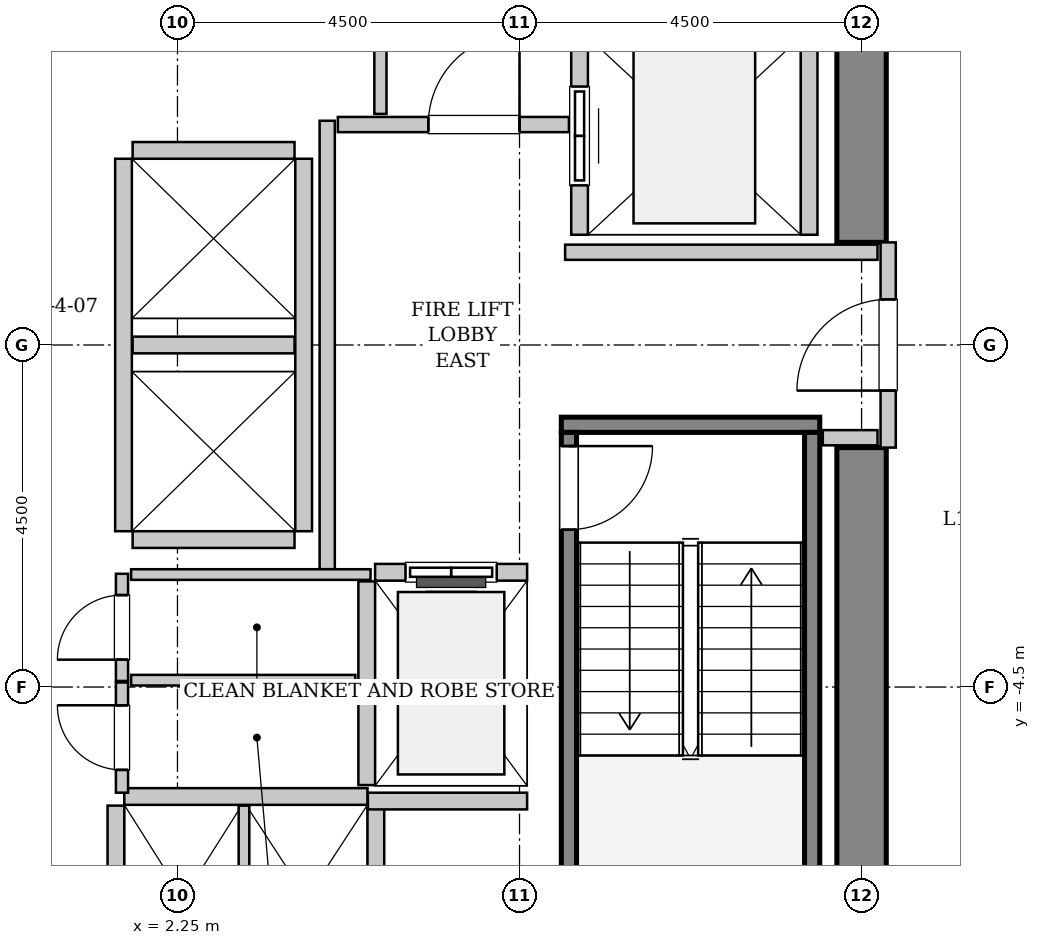
"""IFC4 building model, lengths in metres.
Left out: names, types, materials, properties, quantities, classifications, styles, units other than length and angle.
Written with IfcOpenShell. Run it as: python <this file> out.ifc"""

import sys

from ifc_helpers import new_model, si_unit, direction, frame, frame_2d, origin, place, context, subcontext, project, spatial, rectangle, extrude, source, transform, mapped, element, fill, save


model = new_model("IFC4")
c1 = context("Model", 3, precision=1e-05, world=origin(), true_north=direction((0.0, 1.0)))
c2 = subcontext(c1, "Body", "Model", "MODEL_VIEW")
j1 = project(units=[si_unit("LENGTHUNIT", "METRE"), si_unit("PLANEANGLEUNIT", "RADIAN")], contexts=[c1])
p1 = place(None, origin())
s1 = spatial("IfcSite", under=j1, at=p1, CompositionType="ELEMENT")
p2 = place(p1, origin())
s2 = spatial("IfcBuilding", under=s1, at=p2, CompositionType="ELEMENT")
p3 = place(p2, frame((0.0, 0.0, 55.8)))
s3 = spatial("IfcBuildingStorey", under=s2, at=p3, CompositionType="ELEMENT", Elevation=55.8)
m1 = source(origin(), c2, "Body", "SweptSolid", [
    extrude(rectangle(XDim=7.325, YDim=0.65, at=frame_2d((3.663, 0.0))), origin(), (0.0, 0.0, 1.0), 3.8),
])
for number, where, z_axis, x_axis in (
    (1, (11.25, -8.675, 0.0), (0.0, 0.0, 1.0), (0.0, 1.0, 0.0)),
    (2, (11.25, 1.35, 0.0), (0.0, 0.0, 1.0), (0.0, 1.0, 0.0)),
):
    element("IfcWall", number, at=place(p3, frame(where, z_axis=z_axis, x_axis=x_axis)), inside=s3, PredefinedType="SHEAR", context=c2, shape_type="MappedRepresentation", body=[
        mapped(m1, transform((0.0, 0.0, 0.0), x_axis=(1.0, 0.0, 0.0), y_axis=(0.0, 1.0, 0.0), z_axis=(0.0, 0.0, 1.0), scale=1.0)),
    ])
m2 = source(origin(), c2, "Body", "SweptSolid", [
    extrude(rectangle(XDim=3.4, YDim=0.2, at=frame_2d((1.7, 0.0))), origin(), (0.0, 0.0, 1.0), 3.8),
])
p4 = place(p3, frame((7.3, -1.05, 0.0), z_axis=(0.0, 0.0, 1.0), x_axis=(1.0, 0.0, 0.0)))
e3 = element("IfcWall", 3, at=p4, inside=s3, PredefinedType="SOLIDWALL", context=c2, shape_type="MappedRepresentation", body=[
    mapped(m2, transform((0.0, 0.0, 0.0), x_axis=(1.0, 0.0, 0.0), y_axis=(0.0, 1.0, 0.0), z_axis=(0.0, 0.0, 1.0), scale=1.0)),
])
m3 = source(origin(), c2, "Body", "SweptSolid", [
    extrude(rectangle(XDim=7.1, YDim=0.2, at=frame_2d((3.55, 0.0))), origin(), (0.0, 0.0, 1.0), 3.8),
])
p5 = place(p3, frame((7.4, -1.15, 0.0), z_axis=(0.0, 0.0, 1.0), x_axis=(0.0, -1.0, 0.0)))
e4 = element("IfcWall", 4, at=p5, inside=s3, PredefinedType="SOLIDWALL", context=c2, shape_type="MappedRepresentation", body=[
    mapped(m3, transform((0.0, 0.0, 0.0), x_axis=(1.0, 0.0, 0.0), y_axis=(0.0, 1.0, 0.0), z_axis=(0.0, 0.0, 1.0), scale=1.0)),
])
p6 = place(p5, frame((0.18, 0.0, 0.0)))
e5 = element("IfcOpeningElement", 5, at=p6, cuts=e4, PredefinedType="OPENING", context=c2, shape_type="SweptSolid", body=[
    extrude(rectangle(XDim=1.1, YDim=2.15, at=frame_2d((0.55, 1.075))), frame((0.0, 0.11, 0.0), z_axis=(0.0, -1.0, 0.0), x_axis=(1.0, 0.0, 0.0)), (0.0, 0.0, 1.0), 0.22),
])
p7 = place(p3, frame((10.6, -1.15, 0.0), z_axis=(0.0, 0.0, 1.0), x_axis=(0.0, -1.0, 0.0)))
e6 = element("IfcWall", 6, at=p7, inside=s3, PredefinedType="SOLIDWALL", context=c2, shape_type="MappedRepresentation", body=[
    mapped(m3, transform((0.0, 0.0, 0.0), x_axis=(1.0, 0.0, 0.0), y_axis=(0.0, 1.0, 0.0), z_axis=(0.0, 0.0, 1.0), scale=1.0)),
])
m4 = source(origin(), c2, "Body", "SweptSolid", [
    extrude(rectangle(XDim=2.0, YDim=0.22, at=frame_2d((1.0, 0.0))), origin(), (0.0, 0.0, 1.0), 3.535),
])
p8 = place(p3, frame((6.85, -2.99, 0.0), z_axis=(0.0, 0.0, 1.0), x_axis=(-1.0, 0.0, 0.0)))
e7 = element("IfcWall", 7, at=p8, inside=s3, PredefinedType="SOLIDWALL", context=c2, shape_type="MappedRepresentation", body=[
    mapped(m4, transform((0.0, 0.0, 0.0), x_axis=(1.0, 0.0, 0.0), y_axis=(0.0, 1.0, 0.0), z_axis=(0.0, 0.0, 1.0), scale=1.0)),
])
p9 = place(p8, frame((0.4, 0.0, 0.0)))
e8 = element("IfcOpeningElement", 8, at=p9, cuts=e7, PredefinedType="OPENING", context=c2, shape_type="SweptSolid", body=[
    extrude(rectangle(XDim=1.2, YDim=2.2, at=frame_2d((0.6, 1.1))), frame((0.0, 0.12, 0.0), z_axis=(0.0, -1.0, 0.0), x_axis=(1.0, 0.0, 0.0)), (0.0, 0.0, 1.0), 0.24),
])
m5 = source(origin(), c2, "Body", "SweptSolid", [
    extrude(rectangle(XDim=2.68, YDim=0.22, at=frame_2d((1.34, 0.0))), origin(), (0.0, 0.0, 1.0), 3.535),
])
p10 = place(p3, frame((4.74, -3.11, 0.0), z_axis=(0.0, 0.0, 1.0), x_axis=(0.0, -1.0, 0.0)))
e9 = element("IfcWall", 9, at=p10, inside=s3, PredefinedType="SOLIDWALL", context=c2, shape_type="MappedRepresentation", body=[
    mapped(m5, transform((0.0, 0.0, 0.0), x_axis=(1.0, 0.0, 0.0), y_axis=(0.0, 1.0, 0.0), z_axis=(0.0, 0.0, 1.0), scale=1.0)),
])
m6 = source(origin(), c2, "Body", "SweptSolid", [
    extrude(rectangle(XDim=5.45, YDim=0.22, at=frame_2d((2.725, 0.0))), origin(), (0.0, 0.0, 1.0), 3.535),
])
p11 = place(p3, frame((7.54, 6.9, 0.0), z_axis=(0.0, 0.0, 1.0), x_axis=(0.0, -1.0, 0.0)))
e10 = element("IfcWall", 10, at=p11, inside=s3, PredefinedType="SOLIDWALL", context=c2, shape_type="MappedRepresentation", body=[
    mapped(m6, transform((0.0, 0.0, 0.0), x_axis=(1.0, 0.0, 0.0), y_axis=(0.0, 1.0, 0.0), z_axis=(0.0, 0.0, 1.0), scale=1.0)),
])
p12 = place(p11, frame((3.5, 0.0, 0.0)))
e11 = element("IfcOpeningElement", 11, at=p12, cuts=e10, PredefinedType="OPENING", context=c2, shape_type="SweptSolid", body=[
    extrude(rectangle(XDim=1.3, YDim=2.3, at=frame_2d((0.65, 1.15))), frame((0.0, 0.12, 0.0), z_axis=(0.0, -1.0, 0.0), x_axis=(1.0, 0.0, 0.0)), (0.0, 0.0, 1.0), 0.24),
])
p13 = place(p11, frame((0.65, 0.0, 0.0)))
e12 = element("IfcOpeningElement", 12, at=p13, cuts=e10, PredefinedType="OPENING", context=c2, shape_type="SweptSolid", body=[
    extrude(rectangle(XDim=1.3, YDim=2.3, at=frame_2d((0.65, 1.15))), frame((0.0, 0.12, 0.0), z_axis=(0.0, -1.0, 0.0), x_axis=(1.0, 0.0, 0.0)), (0.0, 0.0, 1.0), 0.24),
])
p14 = place(p3, frame((10.56, 1.45, 0.0), z_axis=(0.0, 0.0, 1.0), x_axis=(0.0, 1.0, 0.0)))
e13 = element("IfcWall", 13, at=p14, inside=s3, PredefinedType="SOLIDWALL", context=c2, shape_type="MappedRepresentation", body=[
    mapped(m6, transform((0.0, 0.0, 0.0), x_axis=(1.0, 0.0, 0.0), y_axis=(0.0, 1.0, 0.0), z_axis=(0.0, 0.0, 1.0), scale=1.0)),
])
m7 = source(origin(), c2, "Body", "SweptSolid", [
    extrude(rectangle(XDim=3.2, YDim=0.22, at=frame_2d((1.6, 0.0))), origin(), (0.0, 0.0, 1.0), 3.535),
])
p15 = place(p3, frame((4.75, -5.94, 0.0), z_axis=(0.0, 0.0, 1.0), x_axis=(-1.0, 0.0, 0.0)))
e14 = element("IfcWall", 14, at=p15, inside=s3, PredefinedType="SOLIDWALL", context=c2, shape_type="MappedRepresentation", body=[
    mapped(m7, transform((0.0, 0.0, 0.0), x_axis=(1.0, 0.0, 0.0), y_axis=(0.0, 1.0, 0.0), z_axis=(0.0, 0.0, 1.0), scale=1.0)),
])
m8 = source(origin(), c2, "Body", "SweptSolid", [
    extrude(rectangle(XDim=2.43, YDim=0.22, at=frame_2d((1.215, 0.0))), origin(), (0.0, 0.0, 1.0), 3.535),
])
p16 = place(p3, frame((1.44, -6.06, 0.0), z_axis=(0.0, 0.0, 1.0), x_axis=(0.0, -1.0, 0.0)))
e15 = element("IfcWall", 15, at=p16, inside=s3, PredefinedType="SOLIDWALL", context=c2, shape_type="MappedRepresentation", body=[
    mapped(m8, transform((0.0, 0.0, 0.0), x_axis=(1.0, 0.0, 0.0), y_axis=(0.0, 1.0, 0.0), z_axis=(0.0, 0.0, 1.0), scale=1.0)),
])
m9 = source(origin(), c2, "Body", "SweptSolid", [
    extrude(rectangle(XDim=2.43, YDim=0.14, at=frame_2d((1.215, 0.0))), origin(), (0.0, 0.0, 1.0), 3.535),
])
p17 = place(p3, frame((3.125, -8.49, 0.0), z_axis=(0.0, 0.0, 1.0), x_axis=(0.0, 1.0, 0.0)))
e16 = element("IfcWall", 16, at=p17, inside=s3, PredefinedType="PARTITIONING", context=c2, shape_type="MappedRepresentation", body=[
    mapped(m9, transform((0.0, 0.0, 0.0), x_axis=(1.0, 0.0, 0.0), y_axis=(0.0, 1.0, 0.0), z_axis=(0.0, 0.0, 1.0), scale=1.0)),
])
p18 = place(p3, frame((4.86, -8.49, 0.0), z_axis=(0.0, 0.0, 1.0), x_axis=(0.0, 1.0, 0.0)))
e17 = element("IfcWall", 17, at=p18, inside=s3, PredefinedType="SOLIDWALL", context=c2, shape_type="MappedRepresentation", body=[
    mapped(m8, transform((0.0, 0.0, 0.0), x_axis=(1.0, 0.0, 0.0), y_axis=(0.0, 1.0, 0.0), z_axis=(0.0, 0.0, 1.0), scale=1.0)),
])
m10 = source(origin(), c2, "Body", "SweptSolid", [
    extrude(rectangle(XDim=4.9, YDim=0.22, at=frame_2d((2.45, 0.0))), origin(), (0.0, 0.0, 1.0), 3.535),
])
for number, where, z_axis, x_axis in (
    (18, (1.54, 2.45, 0.0), (0.0, 0.0, 1.0), (0.0, -1.0, 0.0)),
    (19, (3.91, -2.45, 0.0), (0.0, 0.0, 1.0), (0.0, 1.0, 0.0)),
):
    element("IfcWall", number, at=place(p3, frame(where, z_axis=z_axis, x_axis=x_axis)), inside=s3, PredefinedType="SOLIDWALL", context=c2, shape_type="MappedRepresentation", body=[
        mapped(m10, transform((0.0, 0.0, 0.0), x_axis=(1.0, 0.0, 0.0), y_axis=(0.0, 1.0, 0.0), z_axis=(0.0, 0.0, 1.0), scale=1.0)),
    ])
m11 = source(origin(), c2, "Body", "SweptSolid", [
    extrude(rectangle(XDim=2.13, YDim=0.22, at=frame_2d((1.065, 0.0))), origin(), (0.0, 0.0, 1.0), 3.535),
])
for number, where, z_axis, x_axis in (
    (20, (1.66, -2.56, 0.0), (0.0, 0.0, 1.0), (1.0, 0.0, 0.0)),
    (21, (1.66, 0.0, 0.0), (0.0, 0.0, 1.0), (1.0, 0.0, 0.0)),
    (22, (3.79, 2.56, 0.0), (0.0, 0.0, 1.0), (-1.0, 0.0, 0.0)),
):
    element("IfcWall", number, at=place(p3, frame(where, z_axis=z_axis, x_axis=x_axis)), inside=s3, PredefinedType="SOLIDWALL", context=c2, shape_type="MappedRepresentation", body=[
        mapped(m11, transform((0.0, 0.0, 0.0), x_axis=(1.0, 0.0, 0.0), y_axis=(0.0, 1.0, 0.0), z_axis=(0.0, 0.0, 1.0), scale=1.0)),
    ])
m12 = source(origin(), c2, "Body", "SweptSolid", [
    extrude(rectangle(XDim=2.095, YDim=0.22, at=frame_2d((1.048, 0.0))), origin(), (0.0, 0.0, 1.0), 3.535),
])
p19 = place(p3, frame((4.755, -6.0, 0.0), z_axis=(0.0, 0.0, 1.0), x_axis=(1.0, 0.0, 0.0)))
e23 = element("IfcWall", 23, at=p19, inside=s3, PredefinedType="SOLIDWALL", context=c2, shape_type="MappedRepresentation", body=[
    mapped(m12, transform((0.0, 0.0, 0.0), x_axis=(1.0, 0.0, 0.0), y_axis=(0.0, 1.0, 0.0), z_axis=(0.0, 0.0, 1.0), scale=1.0)),
])
m13 = source(origin(), c2, "Body", "SweptSolid", [
    extrude(rectangle(XDim=2.7, YDim=0.2, at=frame_2d((1.35, 0.0))), origin(), (0.0, 0.0, 1.0), 2.425),
])
p20 = place(p3, frame((11.6, -1.35, 0.0), z_axis=(0.0, 0.0, 1.0), x_axis=(0.0, 1.0, 0.0)))
e24 = element("IfcWall", 24, at=p20, inside=s3, PredefinedType="PARTITIONING", context=c2, shape_type="MappedRepresentation", body=[
    mapped(m13, transform((0.0, 0.0, 0.0), x_axis=(1.0, 0.0, 0.0), y_axis=(0.0, 1.0, 0.0), z_axis=(0.0, 0.0, 1.0), scale=1.0)),
])
p21 = place(p20, frame((0.75, 0.0, 0.0)))
e25 = element("IfcOpeningElement", 25, at=p21, cuts=e24, PredefinedType="OPENING", context=c2, shape_type="SweptSolid", body=[
    extrude(rectangle(XDim=1.2, YDim=2.15, at=frame_2d((0.6, 1.075))), frame((0.0, 0.11, 0.0), z_axis=(0.0, -1.0, 0.0), x_axis=(1.0, 0.0, 0.0)), (0.0, 0.0, 1.0), 0.22),
])
m14 = source(origin(), c2, "Body", "SweptSolid", [
    extrude(rectangle(XDim=5.9, YDim=0.2, at=frame_2d((2.95, 0.0))), origin(), (0.0, 0.0, 1.0), 3.535),
])
p22 = place(p3, frame((4.22, -2.95, 0.0), z_axis=(0.0, 0.0, 1.0), x_axis=(0.0, 1.0, 0.0)))
e26 = element("IfcWall", 26, at=p22, inside=s3, PredefinedType="PARTITIONING", context=c2, shape_type="MappedRepresentation", body=[
    mapped(m14, transform((0.0, 0.0, 0.0), x_axis=(1.0, 0.0, 0.0), y_axis=(0.0, 1.0, 0.0), z_axis=(0.0, 0.0, 1.0), scale=1.0)),
])
m15 = source(origin(), c2, "Body", "SweptSolid", [
    extrude(rectangle(XDim=3.04, YDim=0.2, at=frame_2d((1.52, 0.0))), origin(), (0.0, 0.0, 1.0), 3.535),
])
p23 = place(p3, frame((4.36, 2.9, 0.0), z_axis=(0.0, 0.0, 1.0), x_axis=(1.0, 0.0, 0.0)))
e27 = element("IfcWall", 27, at=p23, inside=s3, PredefinedType="PARTITIONING", context=c2, shape_type="MappedRepresentation", body=[
    mapped(m15, transform((0.0, 0.0, 0.0), x_axis=(1.0, 0.0, 0.0), y_axis=(0.0, 1.0, 0.0), z_axis=(0.0, 0.0, 1.0), scale=1.0)),
])
p24 = place(p23, frame((1.19, 0.0, 0.0)))
e28 = element("IfcOpeningElement", 28, at=p24, cuts=e27, PredefinedType="OPENING", context=c2, shape_type="SweptSolid", body=[
    extrude(rectangle(XDim=1.2, YDim=2.15, at=frame_2d((0.6, 1.075))), frame((0.0, 0.11, 0.0), z_axis=(0.0, -1.0, 0.0), x_axis=(1.0, 0.0, 0.0)), (0.0, 0.0, 1.0), 0.22),
])
m16 = source(origin(), c2, "Body", "SweptSolid", [
    extrude(rectangle(XDim=4.11, YDim=0.2, at=frame_2d((2.055, 0.0))), origin(), (0.0, 0.0, 1.0), 3.535),
])
p25 = place(p3, frame((7.35, 1.22, 0.0), z_axis=(0.0, 0.0, 1.0), x_axis=(1.0, 0.0, 0.0)))
e29 = element("IfcWall", 29, at=p25, inside=s3, PredefinedType="PARTITIONING", context=c2, shape_type="MappedRepresentation", body=[
    mapped(m16, transform((0.0, 0.0, 0.0), x_axis=(1.0, 0.0, 0.0), y_axis=(0.0, 1.0, 0.0), z_axis=(0.0, 0.0, 1.0), scale=1.0)),
])
m17 = source(origin(), c2, "Body", "SweptSolid", [
    extrude(rectangle(XDim=0.72, YDim=0.2, at=frame_2d((0.36, 0.0))), origin(), (0.0, 0.0, 1.0), 3.535),
])
p26 = place(p3, frame((10.74, -1.22, 0.0), z_axis=(0.0, 0.0, 1.0), x_axis=(1.0, 0.0, 0.0)))
e30 = element("IfcWall", 30, at=p26, inside=s3, PredefinedType="PARTITIONING", context=c2, shape_type="MappedRepresentation", body=[
    mapped(m17, transform((0.0, 0.0, 0.0), x_axis=(1.0, 0.0, 0.0), y_axis=(0.0, 1.0, 0.0), z_axis=(0.0, 0.0, 1.0), scale=1.0)),
])
m18 = source(origin(), c2, "Body", "SweptSolid", [
    extrude(rectangle(XDim=3.015, YDim=0.16, at=frame_2d((1.507, 0.0))), origin(), (0.0, 0.0, 1.0), 3.535),
])
p27 = place(p3, frame((4.92, 3.04, 0.0), z_axis=(0.0, 0.0, 1.0), x_axis=(0.0, 1.0, 0.0)))
e31 = element("IfcWall", 31, at=p27, inside=s3, PredefinedType="PARTITIONING", context=c2, shape_type="MappedRepresentation", body=[
    mapped(m18, transform((0.0, 0.0, 0.0), x_axis=(1.0, 0.0, 0.0), y_axis=(0.0, 1.0, 0.0), z_axis=(0.0, 0.0, 1.0), scale=1.0)),
])
m19 = source(origin(), c2, "Body", "SweptSolid", [
    extrude(rectangle(XDim=1.41, YDim=0.16, at=frame_2d((0.705, 0.0))), origin(), (0.0, 0.0, 1.0), 3.535),
])
p28 = place(p3, frame((1.52, -4.42, 0.0), z_axis=(0.0, 0.0, 1.0), x_axis=(0.0, 1.0, 0.0)))
e32 = element("IfcWall", 32, at=p28, inside=s3, PredefinedType="PARTITIONING", context=c2, shape_type="MappedRepresentation", body=[
    mapped(m19, transform((0.0, 0.0, 0.0), x_axis=(1.0, 0.0, 0.0), y_axis=(0.0, 1.0, 0.0), z_axis=(0.0, 0.0, 1.0), scale=1.0)),
])
p29 = place(p28, frame((0.28, 0.0, 0.0)))
e33 = element("IfcOpeningElement", 33, at=p29, cuts=e32, PredefinedType="OPENING", context=c2, shape_type="SweptSolid", body=[
    extrude(rectangle(XDim=0.85, YDim=2.1, at=frame_2d((0.425, 1.05))), frame((0.0, 0.09, 0.0), z_axis=(0.0, -1.0, 0.0), x_axis=(1.0, 0.0, 0.0)), (0.0, 0.0, 1.0), 0.18),
])
m20 = source(origin(), c2, "Body", "SweptSolid", [
    extrude(rectangle(XDim=3.15, YDim=0.14, at=frame_2d((1.575, 0.0))), origin(), (0.0, 0.0, 1.0), 3.535),
])
p30 = place(p3, frame((1.64, -3.02, 0.0), z_axis=(0.0, 0.0, 1.0), x_axis=(1.0, 0.0, 0.0)))
e34 = element("IfcWall", 34, at=p30, inside=s3, PredefinedType="PARTITIONING", context=c2, shape_type="MappedRepresentation", body=[
    mapped(m20, transform((0.0, 0.0, 0.0), x_axis=(1.0, 0.0, 0.0), y_axis=(0.0, 1.0, 0.0), z_axis=(0.0, 0.0, 1.0), scale=1.0)),
])
m21 = source(origin(), c2, "Body", "SweptSolid", [
    extrude(rectangle(XDim=2.95, YDim=0.14, at=frame_2d((1.475, 0.0))), origin(), (0.0, 0.0, 1.0), 3.535),
])
p31 = place(p3, frame((1.64, -4.41, 0.0), z_axis=(0.0, 0.0, 1.0), x_axis=(1.0, 0.0, 0.0)))
e35 = element("IfcWall", 35, at=p31, inside=s3, PredefinedType="PARTITIONING", context=c2, shape_type="MappedRepresentation", body=[
    mapped(m21, transform((0.0, 0.0, 0.0), x_axis=(1.0, 0.0, 0.0), y_axis=(0.0, 1.0, 0.0), z_axis=(0.0, 0.0, 1.0), scale=1.0)),
])
m22 = source(origin(), c2, "Body", "SweptSolid", [
    extrude(rectangle(XDim=1.45, YDim=0.16, at=frame_2d((0.725, 0.0))), origin(), (0.0, 0.0, 1.0), 3.535),
])
p32 = place(p3, frame((1.52, -5.89, 0.0), z_axis=(0.0, 0.0, 1.0), x_axis=(0.0, 1.0, 0.0)))
e36 = element("IfcWall", 36, at=p32, inside=s3, PredefinedType="PARTITIONING", context=c2, shape_type="MappedRepresentation", body=[
    mapped(m22, transform((0.0, 0.0, 0.0), x_axis=(1.0, 0.0, 0.0), y_axis=(0.0, 1.0, 0.0), z_axis=(0.0, 0.0, 1.0), scale=1.0)),
])
p33 = place(p32, frame((0.3, 0.0, 0.0)))
e37 = element("IfcOpeningElement", 37, at=p33, cuts=e36, PredefinedType="OPENING", context=c2, shape_type="SweptSolid", body=[
    extrude(rectangle(XDim=0.85, YDim=2.1, at=frame_2d((0.425, 1.05))), frame((0.0, 0.09, 0.0), z_axis=(0.0, -1.0, 0.0), x_axis=(1.0, 0.0, 0.0)), (0.0, 0.0, 1.0), 0.18),
])
m23 = source(origin(), c2, "Body", "SweptSolid", [
    extrude(rectangle(XDim=1.1, YDim=2.15, at=frame_2d((0.55, 1.075))), frame((0.0, 0.025, 0.0), z_axis=(0.0, -1.0, 0.0), x_axis=(1.0, 0.0, 0.0)), (0.0, 0.0, 1.0), 0.05),
])
p34 = place(p6, origin())
e38 = element("IfcDoor", 38, at=p34, inside=s3, OperationType="SINGLE_SWING_LEFT", PredefinedType="DOOR", context=c2, shape_type="MappedRepresentation", body=[
    mapped(m23, transform((0.0, 0.0, 0.0), x_axis=(1.0, 0.0, 0.0), y_axis=(0.0, 1.0, 0.0), z_axis=(0.0, 0.0, 1.0), scale=1.0)),
])
fill(e5, e38)
m24 = source(origin(), c2, "Body", "SweptSolid", [
    extrude(rectangle(XDim=1.2, YDim=2.2, at=frame_2d((0.6, 1.1))), frame((0.0, 0.025, 0.0), z_axis=(0.0, -1.0, 0.0), x_axis=(1.0, 0.0, 0.0)), (0.0, 0.0, 1.0), 0.05),
])
p35 = place(p9, origin())
e39 = element("IfcDoor", 39, at=p35, inside=s3, OperationType="SLIDING_TO_LEFT", PredefinedType="DOOR", context=c2, shape_type="MappedRepresentation", body=[
    mapped(m24, transform((0.0, 0.0, 0.0), x_axis=(1.0, 0.0, 0.0), y_axis=(0.0, 1.0, 0.0), z_axis=(0.0, 0.0, 1.0), scale=1.0)),
])
fill(e8, e39)
m25 = source(origin(), c2, "Body", "SweptSolid", [
    extrude(rectangle(XDim=1.3, YDim=2.3, at=frame_2d((0.65, 1.15))), frame((0.0, 0.025, 0.0), z_axis=(0.0, -1.0, 0.0), x_axis=(1.0, 0.0, 0.0)), (0.0, 0.0, 1.0), 0.05),
])
p36 = place(p12, origin())
e40 = element("IfcDoor", 40, at=p36, inside=s3, OperationType="SLIDING_TO_RIGHT", PredefinedType="DOOR", context=c2, shape_type="MappedRepresentation", body=[
    mapped(m25, transform((0.0, 0.0, 0.0), x_axis=(1.0, 0.0, 0.0), y_axis=(0.0, 1.0, 0.0), z_axis=(0.0, 0.0, 1.0), scale=1.0)),
])
fill(e11, e40)
m26 = source(origin(), c2, "Body", "SweptSolid", [
    extrude(rectangle(XDim=1.2, YDim=2.15, at=frame_2d((0.6, 1.075))), frame((0.0, 0.025, 0.0), z_axis=(0.0, -1.0, 0.0), x_axis=(1.0, 0.0, 0.0)), (0.0, 0.0, 1.0), 0.05),
])
p37 = place(p21, origin())
e41 = element("IfcDoor", 41, at=p37, inside=s3, OperationType="SINGLE_SWING_LEFT", PredefinedType="DOOR", context=c2, shape_type="MappedRepresentation", body=[
    mapped(m26, transform((0.0, 0.0, 0.0), x_axis=(1.0, 0.0, 0.0), y_axis=(0.0, 1.0, 0.0), z_axis=(0.0, 0.0, 1.0), scale=1.0)),
])
fill(e25, e41)
p38 = place(p24, origin())
e42 = element("IfcDoor", 42, at=p38, inside=s3, OperationType="SINGLE_SWING_RIGHT", PredefinedType="DOOR", context=c2, shape_type="MappedRepresentation", body=[
    mapped(m26, transform((0.0, 0.0, 0.0), x_axis=(1.0, 0.0, 0.0), y_axis=(0.0, 1.0, 0.0), z_axis=(0.0, 0.0, 1.0), scale=1.0)),
])
fill(e28, e42)
m27 = source(origin(), c2, "Body", "SweptSolid", [
    extrude(rectangle(XDim=0.85, YDim=2.1, at=frame_2d((0.425, 1.05))), frame((0.0, 0.025, 0.0), z_axis=(0.0, -1.0, 0.0), x_axis=(1.0, 0.0, 0.0)), (0.0, 0.0, 1.0), 0.05),
])
p39 = place(p29, origin())
e43 = element("IfcDoor", 43, at=p39, inside=s3, OperationType="SINGLE_SWING_LEFT", PredefinedType="DOOR", context=c2, shape_type="MappedRepresentation", body=[
    mapped(m27, transform((0.0, 0.0, 0.0), x_axis=(1.0, 0.0, 0.0), y_axis=(0.0, 1.0, 0.0), z_axis=(0.0, 0.0, 1.0), scale=1.0)),
])
fill(e33, e43)
p40 = place(p33, origin())
e44 = element("IfcDoor", 44, at=p40, inside=s3, OperationType="SINGLE_SWING_RIGHT", PredefinedType="DOOR", context=c2, shape_type="MappedRepresentation", body=[
    mapped(m27, transform((0.0, 0.0, 0.0), x_axis=(1.0, 0.0, 0.0), y_axis=(0.0, 1.0, 0.0), z_axis=(0.0, 0.0, 1.0), scale=1.0)),
])
fill(e37, e44)
save(model, sys.argv[1])
